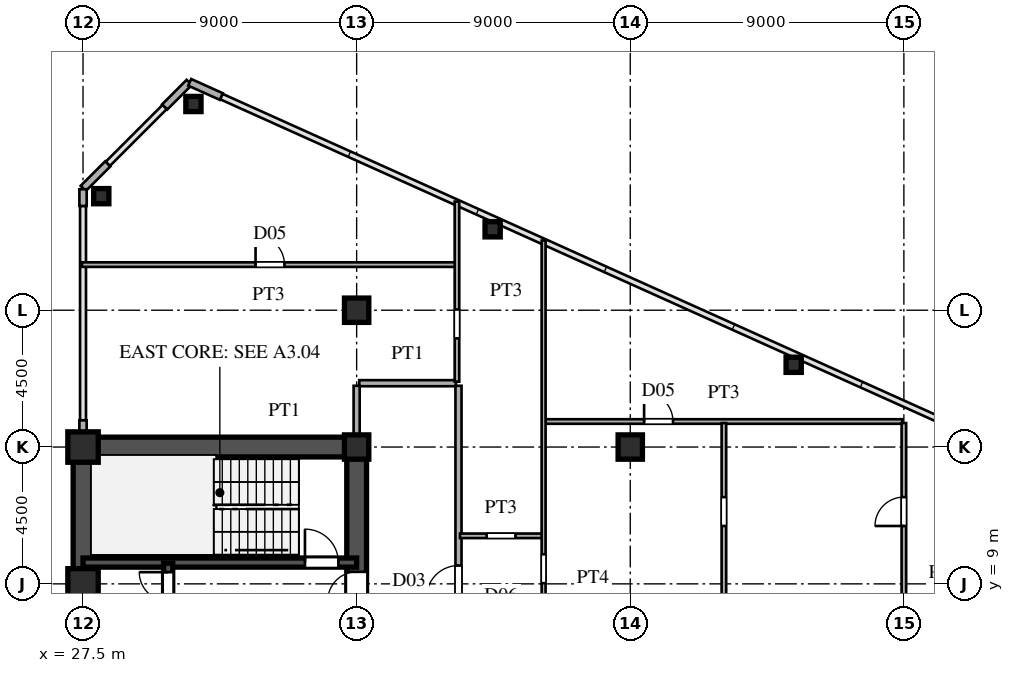
"""IFC4 building model, lengths in metres.
Left out: names, types, materials, properties, quantities, classifications, styles, units other than length and angle.
Written with IfcOpenShell. Run it as: python <this file> out.ifc"""

import sys

from ifc_helpers import new_model, si_unit, direction, frame, frame_2d, origin, origin_2d, place, context, subcontext, project, spatial, rectangle, hollow_rectangle, i_section, extrude, source, transform, mapped, element, fill, save


model = new_model("IFC4")
c1 = context("Model", 3, precision=1e-05, world=origin(), true_north=direction((0.0, 1.0)))
c2 = subcontext(c1, "Body", "Model", "MODEL_VIEW")
j1 = project(units=[si_unit("LENGTHUNIT", "METRE"), si_unit("PLANEANGLEUNIT", "RADIAN")], contexts=[c1])
p1 = place(None, origin())
s1 = spatial("IfcSite", under=j1, at=p1, CompositionType="ELEMENT")
p2 = place(p1, origin())
s2 = spatial("IfcBuilding", under=s1, at=p2, CompositionType="ELEMENT")
p3 = place(p2, frame((0.0, 0.0, 92.4)))
s3 = spatial("IfcBuildingStorey", under=s2, at=p3, CompositionType="ELEMENT", Elevation=92.4)
m1 = source(origin(), c2, "Body", "SweptSolid", [
    extrude(hollow_rectangle(XDim=1.0, YDim=1.0, WallThickness=0.042, at=origin_2d()), origin(), (0.0, 0.0, 1.0), 3.6),
])
for number, where, z_axis, x_axis in (
    (1, (27.5, 9.0, 0.0), (0.0, 0.0, 1.0), (1.0, 0.0, 0.0)),
    (2, (27.5, 13.5, 0.0), (0.0, 0.0, 1.0), (1.0, 0.0, 0.0)),
):
    element("IfcColumn", number, at=place(p3, frame(where, z_axis=z_axis, x_axis=x_axis)), inside=s3, PredefinedType="COLUMN", context=c2, shape_type="MappedRepresentation", body=[
        mapped(m1, transform((0.0, 0.0, 0.0), scale=1.0)),
    ])
m2 = source(origin(), c2, "Body", "SweptSolid", [
    extrude(i_section(OverallWidth=0.8, OverallDepth=0.8, WebThickness=0.032, FlangeThickness=0.05, at=origin_2d()), origin(), (0.0, 0.0, 1.0), 3.6),
])
for number, where, z_axis, x_axis in (
    (3, (36.5, 13.5, 0.0), (0.0, 0.0, 1.0), (1.0, 0.0, 0.0)),
    (4, (36.5, 18.0, 0.0), (0.0, 0.0, 1.0), (1.0, 0.0, 0.0)),
    (5, (45.5, 13.5, 0.0), (0.0, 0.0, 1.0), (1.0, 0.0, 0.0)),
):
    element("IfcColumn", number, at=place(p3, frame(where, z_axis=z_axis, x_axis=x_axis)), inside=s3, PredefinedType="COLUMN", context=c2, shape_type="MappedRepresentation", body=[
        mapped(m2, transform((0.0, 0.0, 0.0), scale=1.0)),
    ])
m3 = source(origin(), c2, "Body", "SweptSolid", [
    extrude(hollow_rectangle(XDim=0.5, YDim=0.5, WallThickness=0.02, at=origin_2d()), origin(), (0.0, 0.0, 1.0), 3.6),
])
for number, where, z_axis, x_axis in (
    (6, (31.131, 24.783, 0.0), (0.0, 0.0, 1.0), (1.0, 0.0, 0.0)),
    (7, (28.1, 21.751, 0.0), (0.0, 0.0, 1.0), (1.0, 0.0, 0.0)),
    (8, (40.973, 20.661, 0.0), (0.0, 0.0, 1.0), (1.0, 0.0, 0.0)),
    (9, (50.875, 16.205, 0.0), (0.0, 0.0, 1.0), (1.0, 0.0, 0.0)),
):
    element("IfcColumn", number, at=place(p3, frame(where, z_axis=z_axis, x_axis=x_axis)), inside=s3, PredefinedType="COLUMN", context=c2, shape_type="MappedRepresentation", body=[
        mapped(m3, transform((0.0, 0.0, 0.0), scale=1.0)),
    ])
p4 = place(p3, frame((32.049, 25.028, 0.0), z_axis=(0.0, 0.0, 1.0), x_axis=(-0.911929519623, 0.410346866979, 0.0)))
e10 = element("IfcWall", 10, at=p4, inside=s3, PredefinedType="SOLIDWALL", context=c2, shape_type="SweptSolid", body=[
    extrude(rectangle(XDim=1.14, YDim=0.24, at=frame_2d((0.57, 0.0))), origin(), (0.0, 0.0, 1.0), 3.38),
])
for number, where, z_axis, x_axis in (
    (11, (30.993, 25.493, 0.0), (0.0, 0.0, 1.0), (-0.707, -0.707, 0.0)),
    (12, (28.313, 22.813, 0.0), (0.0, 0.0, 1.0), (-0.707, -0.707, 0.0)),
):
    element("IfcWall", number, at=place(p3, frame(where, z_axis=z_axis, x_axis=x_axis)), inside=s3, PredefinedType="SOLIDWALL", context=c2, shape_type="SweptSolid", body=[
        extrude(rectangle(XDim=1.14, YDim=0.24, at=frame_2d((0.57, 0.0))), origin(), (0.0, 0.0, 1.0), 3.38),
    ])
p5 = place(p3, frame((27.5, 13.83, 0.0), z_axis=(0.0, 0.0, 1.0), x_axis=(0.0, 1.0, 0.0)))
e13 = element("IfcWall", 13, at=p5, inside=s3, PredefinedType="SOLIDWALL", context=c2, shape_type="SweptSolid", body=[
    extrude(rectangle(XDim=0.55, YDim=0.24, at=frame_2d((0.275, 0.0))), origin(), (0.0, 0.0, 1.0), 2.88),
])
p6 = place(p3, frame((27.5, 21.43, 0.0), z_axis=(0.0, 0.0, 1.0), x_axis=(0.0, 1.0, 0.0)))
e14 = element("IfcWall", 14, at=p6, inside=s3, PredefinedType="SOLIDWALL", context=c2, shape_type="SweptSolid", body=[
    extrude(rectangle(XDim=0.55, YDim=0.24, at=frame_2d((0.275, 0.0))), origin(), (0.0, 0.0, 1.0), 3.38),
])
p7 = place(p3, frame((27.5, 1.3, 0.0), z_axis=(0.0, 0.0, 1.0), x_axis=(0.0, 1.0, 0.0)))
e15 = element("IfcWall", 15, at=p7, inside=s3, PredefinedType="SHEAR", context=c2, shape_type="SweptSolid", body=[
    extrude(rectangle(XDim=12.2, YDim=0.65, at=frame_2d((6.1, 0.0))), origin(), (0.0, 0.0, 1.0), 3.38),
])
p8 = place(p3, frame((27.5, 13.5, 0.0), z_axis=(0.0, 0.0, 1.0), x_axis=(1.0, 0.0, 0.0)))
e16 = element("IfcWall", 16, at=p8, inside=s3, PredefinedType="SHEAR", context=c2, shape_type="SweptSolid", body=[
    extrude(rectangle(XDim=9.0, YDim=0.65, at=frame_2d((4.5, 0.0))), origin(), (0.0, 0.0, 1.0), 3.38),
])
p9 = place(p3, frame((36.5, 8.2, 0.0), z_axis=(0.0, 0.0, 1.0), x_axis=(0.0, 1.0, 0.0)))
e17 = element("IfcWall", 17, at=p9, inside=s3, PredefinedType="SHEAR", context=c2, shape_type="SweptSolid", body=[
    extrude(rectangle(XDim=5.45, YDim=0.65, at=frame_2d((2.725, 0.0))), origin(), (0.0, 0.0, 1.0), 3.38),
])
p10 = place(p9, frame((0.245, 0.0, 0.0)))
e18 = element("IfcOpeningElement", 18, at=p10, cuts=e17, PredefinedType="OPENING", context=c2, shape_type="SweptSolid", body=[
    extrude(rectangle(XDim=0.95, YDim=2.15, at=frame_2d((0.475, 1.075))), frame((0.0, 0.335, 0.0), z_axis=(0.0, -1.0, 0.0), x_axis=(1.0, 0.0, 0.0)), (0.0, 0.0, 1.0), 0.67),
])
p11 = place(p3, frame((27.5, 9.7, 0.0), z_axis=(0.0, 0.0, 1.0), x_axis=(1.0, 0.0, 0.0)))
e19 = element("IfcWall", 19, at=p11, inside=s3, PredefinedType="SHEAR", context=c2, shape_type="SweptSolid", body=[
    extrude(rectangle(XDim=9.0, YDim=0.3, at=frame_2d((4.5, 0.0))), origin(), (0.0, 0.0, 1.0), 3.38),
])
p12 = place(p11, frame((7.3, 0.0, 0.0)))
e20 = element("IfcOpeningElement", 20, at=p12, cuts=e19, PredefinedType="OPENING", context=c2, shape_type="SweptSolid", body=[
    extrude(rectangle(XDim=1.1, YDim=2.2, at=frame_2d((0.55, 1.1))), frame((0.0, 0.16, 0.0), z_axis=(0.0, -1.0, 0.0), x_axis=(1.0, 0.0, 0.0)), (0.0, 0.0, 1.0), 0.32),
])
p13 = place(p3, frame((30.3, 8.15, 0.0), z_axis=(0.0, 0.0, 1.0), x_axis=(0.0, 1.0, 0.0)))
e21 = element("IfcWall", 21, at=p13, inside=s3, PredefinedType="SHEAR", context=c2, shape_type="SweptSolid", body=[
    extrude(rectangle(XDim=1.53, YDim=0.3, at=frame_2d((0.765, 0.0))), origin(), (0.0, 0.0, 1.0), 3.38),
])
p14 = place(p13, frame((0.285, 0.0, 0.0)))
e22 = element("IfcOpeningElement", 22, at=p14, cuts=e21, PredefinedType="OPENING", context=c2, shape_type="SweptSolid", body=[
    extrude(rectangle(XDim=0.95, YDim=2.15, at=frame_2d((0.475, 1.075))), frame((0.0, 0.16, 0.0), z_axis=(0.0, -1.0, 0.0), x_axis=(1.0, 0.0, 0.0)), (0.0, 0.0, 1.0), 0.32),
])
p15 = place(p3, frame((39.9, 10.58, 0.0), z_axis=(0.0, 0.0, 1.0), x_axis=(1.0, 0.0, 0.0)))
e23 = element("IfcWall", 23, at=p15, inside=s3, PredefinedType="PARTITIONING", context=c2, shape_type="SweptSolid", body=[
    extrude(rectangle(XDim=2.7, YDim=0.15, at=frame_2d((1.35, 0.0))), origin(), (0.0, 0.0, 1.0), 3.38),
])
p16 = place(p15, frame((0.875, 0.0, 0.0)))
e24 = element("IfcOpeningElement", 24, at=p16, cuts=e23, PredefinedType="OPENING", context=c2, shape_type="SweptSolid", body=[
    extrude(rectangle(XDim=0.95, YDim=2.15, at=frame_2d((0.475, 1.075))), frame((0.0, 0.085, 0.0), z_axis=(0.0, -1.0, 0.0), x_axis=(1.0, 0.0, 0.0)), (0.0, 0.0, 1.0), 0.17),
])
p17 = place(p3, frame((42.7, 14.34, 0.0), z_axis=(0.0, 0.0, 1.0), x_axis=(1.0, 0.0, 0.0)))
e25 = element("IfcWall", 25, at=p17, inside=s3, PredefinedType="PARTITIONING", context=c2, shape_type="SweptSolid", body=[
    extrude(rectangle(XDim=11.75, YDim=0.15, at=frame_2d((5.875, 0.0))), origin(), (0.0, 0.0, 1.0), 3.38),
])
p18 = place(p17, frame((3.255, 0.0, 0.0)))
e26 = element("IfcOpeningElement", 26, at=p18, cuts=e25, PredefinedType="OPENING", context=c2, shape_type="SweptSolid", body=[
    extrude(rectangle(XDim=0.95, YDim=2.15, at=frame_2d((0.475, 1.075))), frame((0.0, 0.085, 0.0), z_axis=(0.0, -1.0, 0.0), x_axis=(1.0, 0.0, 0.0)), (0.0, 0.0, 1.0), 0.17),
])
p19 = place(p3, frame((36.585, 15.6, 0.0), z_axis=(0.0, 0.0, 1.0), x_axis=(1.0, 0.0, 0.0)))
e27 = element("IfcWall", 27, at=p19, inside=s3, PredefinedType="PARTITIONING", context=c2, shape_type="SweptSolid", body=[
    extrude(rectangle(XDim=3.18, YDim=0.2, at=frame_2d((1.59, 0.0))), origin(), (0.0, 0.0, 1.0), 3.38),
])
p20 = place(p3, frame((27.465, 19.5, 0.0), z_axis=(0.0, 0.0, 1.0), x_axis=(1.0, 0.0, 0.0)))
e28 = element("IfcWall", 28, at=p20, inside=s3, PredefinedType="PARTITIONING", context=c2, shape_type="SweptSolid", body=[
    extrude(rectangle(XDim=12.285, YDim=0.15, at=frame_2d((6.143, 0.0))), origin(), (0.0, 0.0, 1.0), 3.38),
])
p21 = place(p20, frame((5.71, 0.0, 0.0)))
e29 = element("IfcOpeningElement", 29, at=p21, cuts=e28, PredefinedType="OPENING", context=c2, shape_type="SweptSolid", body=[
    extrude(rectangle(XDim=0.95, YDim=2.15, at=frame_2d((0.475, 1.075))), frame((0.0, 0.085, 0.0), z_axis=(0.0, -1.0, 0.0), x_axis=(1.0, 0.0, 0.0)), (0.0, 0.0, 1.0), 0.17),
])
p22 = place(p3, frame((36.5, 13.83, 0.0), z_axis=(0.0, 0.0, 1.0), x_axis=(0.0, 1.0, 0.0)))
e30 = element("IfcWall", 30, at=p22, inside=s3, PredefinedType="PARTITIONING", context=c2, shape_type="SweptSolid", body=[
    extrude(rectangle(XDim=1.685, YDim=0.2, at=frame_2d((0.842, 0.0))), origin(), (0.0, 0.0, 1.0), 2.68),
])
p23 = place(p3, frame((39.8, 15.65, 0.0), z_axis=(0.0, 0.0, 1.0), x_axis=(0.0, 1.0, 0.0)))
e31 = element("IfcWall", 31, at=p23, inside=s3, PredefinedType="PARTITIONING", context=c2, shape_type="SweptSolid", body=[
    extrude(rectangle(XDim=5.925, YDim=0.15, at=frame_2d((2.962, 0.0))), origin(), (0.0, 0.0, 1.0), 3.38),
])
p24 = place(p23, frame((1.425, 0.0, 0.0)))
e32 = element("IfcOpeningElement", 32, at=p24, cuts=e31, PredefinedType="OPENING", context=c2, shape_type="SweptSolid", body=[
    extrude(rectangle(XDim=0.95, YDim=2.15, at=frame_2d((0.475, 1.075))), frame((0.0, 0.085, 0.0), z_axis=(0.0, -1.0, 0.0), x_axis=(1.0, 0.0, 0.0)), (0.0, 0.0, 1.0), 0.17),
])
p25 = place(p3, frame((39.85, -15.515, 0.0), z_axis=(0.0, 0.0, 1.0), x_axis=(0.0, 1.0, 0.0)))
e33 = element("IfcWall", 33, at=p25, inside=s3, PredefinedType="PARTITIONING", context=c2, shape_type="SweptSolid", body=[
    extrude(rectangle(XDim=31.03, YDim=0.2, at=frame_2d((15.515, 0.0))), origin(), (0.0, 0.0, 1.0), 3.38),
])
p26 = place(p25, frame((0.94, 0.0, 0.0)))
e34 = element("IfcOpeningElement", 34, at=p26, cuts=e33, PredefinedType="OPENING", context=c2, shape_type="SweptSolid", body=[
    extrude(rectangle(XDim=1.05, YDim=2.25, at=frame_2d((0.525, 1.125))), frame((0.0, 0.11, 0.0), z_axis=(0.0, -1.0, 0.0), x_axis=(1.0, 0.0, 0.0)), (0.0, 0.0, 1.0), 0.22),
])
p27 = place(p25, frame((9.765, 0.0, 0.0)))
e35 = element("IfcOpeningElement", 35, at=p27, cuts=e33, PredefinedType="OPENING", context=c2, shape_type="SweptSolid", body=[
    extrude(rectangle(XDim=1.05, YDim=2.25, at=frame_2d((0.525, 1.125))), frame((0.0, 0.11, 0.0), z_axis=(0.0, -1.0, 0.0), x_axis=(1.0, 0.0, 0.0)), (0.0, 0.0, 1.0), 0.22),
])
p28 = place(p25, frame((24.067, 0.0, 0.0)))
e36 = element("IfcOpeningElement", 36, at=p28, cuts=e33, PredefinedType="OPENING", context=c2, shape_type="SweptSolid", body=[
    extrude(rectangle(XDim=1.05, YDim=2.25, at=frame_2d((0.525, 1.125))), frame((0.0, 0.11, 0.0), z_axis=(0.0, -1.0, 0.0), x_axis=(1.0, 0.0, 0.0)), (0.0, 0.0, 1.0), 0.22),
])
p29 = place(p3, frame((42.65, -1.948, 0.0), z_axis=(0.0, 0.0, 1.0), x_axis=(0.0, 1.0, 0.0)))
e37 = element("IfcWall", 37, at=p29, inside=s3, PredefinedType="PARTITIONING", context=c2, shape_type="SweptSolid", body=[
    extrude(rectangle(XDim=22.241, YDim=0.13, at=frame_2d((11.121, 0.0))), origin(), (0.0, 0.0, 1.0), 3.38),
])
p30 = place(p29, frame((10.971, 0.0, 0.0)))
e38 = element("IfcOpeningElement", 38, at=p30, cuts=e37, PredefinedType="OPENING", context=c2, shape_type="SweptSolid", body=[
    extrude(rectangle(XDim=0.95, YDim=2.15, at=frame_2d((0.475, 1.075))), frame((0.0, 0.075, 0.0), z_axis=(0.0, -1.0, 0.0), x_axis=(1.0, 0.0, 0.0)), (0.0, 0.0, 1.0), 0.15),
])
p31 = place(p3, frame((48.58, -12.45, 0.0), z_axis=(0.0, 0.0, 1.0), x_axis=(0.0, 1.0, 0.0)))
e39 = element("IfcWall", 39, at=p31, inside=s3, PredefinedType="PARTITIONING", context=c2, shape_type="SweptSolid", body=[
    extrude(rectangle(XDim=26.738, YDim=0.15, at=frame_2d((13.369, 0.0))), origin(), (0.0, 0.0, 1.0), 3.38),
])
p32 = place(p31, frame((6.975, 0.0, 0.0)))
e40 = element("IfcOpeningElement", 40, at=p32, cuts=e39, PredefinedType="OPENING", context=c2, shape_type="SweptSolid", body=[
    extrude(rectangle(XDim=0.95, YDim=2.15, at=frame_2d((0.475, 1.075))), frame((0.0, 0.085, 0.0), z_axis=(0.0, -1.0, 0.0), x_axis=(1.0, 0.0, 0.0)), (0.0, 0.0, 1.0), 0.17),
])
p33 = place(p31, frame((1.975, 0.0, 0.0)))
e41 = element("IfcOpeningElement", 41, at=p33, cuts=e39, PredefinedType="OPENING", context=c2, shape_type="SweptSolid", body=[
    extrude(rectangle(XDim=0.95, YDim=2.15, at=frame_2d((0.475, 1.075))), frame((0.0, 0.085, 0.0), z_axis=(0.0, -1.0, 0.0), x_axis=(1.0, 0.0, 0.0)), (0.0, 0.0, 1.0), 0.17),
])
p34 = place(p31, frame((23.354, 0.0, 0.0)))
e42 = element("IfcOpeningElement", 42, at=p34, cuts=e39, PredefinedType="OPENING", context=c2, shape_type="SweptSolid", body=[
    extrude(rectangle(XDim=0.95, YDim=2.15, at=frame_2d((0.475, 1.075))), frame((0.0, 0.085, 0.0), z_axis=(0.0, -1.0, 0.0), x_axis=(1.0, 0.0, 0.0)), (0.0, 0.0, 1.0), 0.17),
])
p35 = place(p31, frame((17.435, 0.0, 0.0)))
e43 = element("IfcOpeningElement", 43, at=p35, cuts=e39, PredefinedType="OPENING", context=c2, shape_type="SweptSolid", body=[
    extrude(rectangle(XDim=0.95, YDim=2.15, at=frame_2d((0.475, 1.075))), frame((0.0, 0.085, 0.0), z_axis=(0.0, -1.0, 0.0), x_axis=(1.0, 0.0, 0.0)), (0.0, 0.0, 1.0), 0.17),
])
p36 = place(p3, frame((54.5, -12.45, 0.0), z_axis=(0.0, 0.0, 1.0), x_axis=(0.0, 1.0, 0.0)))
e44 = element("IfcWall", 44, at=p36, inside=s3, PredefinedType="PARTITIONING", context=c2, shape_type="SweptSolid", body=[
    extrude(rectangle(XDim=26.738, YDim=0.15, at=frame_2d((13.369, 0.0))), origin(), (0.0, 0.0, 1.0), 2.68),
])
p37 = place(p36, frame((6.458, 0.0, 0.0)))
e45 = element("IfcOpeningElement", 45, at=p37, cuts=e44, PredefinedType="OPENING", context=c2, shape_type="SweptSolid", body=[
    extrude(rectangle(XDim=0.95, YDim=2.15, at=frame_2d((0.475, 1.075))), frame((0.0, 0.085, 0.0), z_axis=(0.0, -1.0, 0.0), x_axis=(1.0, 0.0, 0.0)), (0.0, 0.0, 1.0), 0.17),
])
p38 = place(p36, frame((11.975, 0.0, 0.0)))
e46 = element("IfcOpeningElement", 46, at=p38, cuts=e44, PredefinedType="OPENING", context=c2, shape_type="SweptSolid", body=[
    extrude(rectangle(XDim=0.95, YDim=2.15, at=frame_2d((0.475, 1.075))), frame((0.0, 0.085, 0.0), z_axis=(0.0, -1.0, 0.0), x_axis=(1.0, 0.0, 0.0)), (0.0, 0.0, 1.0), 0.17),
])
p39 = place(p36, frame((23.354, 0.0, 0.0)))
e47 = element("IfcOpeningElement", 47, at=p39, cuts=e44, PredefinedType="OPENING", context=c2, shape_type="SweptSolid", body=[
    extrude(rectangle(XDim=0.95, YDim=2.15, at=frame_2d((0.475, 1.075))), frame((0.0, 0.085, 0.0), z_axis=(0.0, -1.0, 0.0), x_axis=(1.0, 0.0, 0.0)), (0.0, 0.0, 1.0), 0.17),
])
p40 = place(p36, frame((17.435, 0.0, 0.0)))
e48 = element("IfcOpeningElement", 48, at=p40, cuts=e44, PredefinedType="OPENING", context=c2, shape_type="SweptSolid", body=[
    extrude(rectangle(XDim=0.95, YDim=2.15, at=frame_2d((0.475, 1.075))), frame((0.0, 0.085, 0.0), z_axis=(0.0, -1.0, 0.0), x_axis=(1.0, 0.0, 0.0)), (0.0, 0.0, 1.0), 0.17),
])
m4 = source(origin(), c2, "Body", "SweptSolid", [
    extrude(rectangle(XDim=0.95, YDim=2.15, at=frame_2d((0.475, 1.075))), frame((0.0, 0.025, 0.0), z_axis=(0.0, -1.0, 0.0), x_axis=(1.0, 0.0, 0.0)), (0.0, 0.0, 1.0), 0.05),
])
p41 = place(p10, origin())
e49 = element("IfcDoor", 49, at=p41, inside=s3, OperationType="SINGLE_SWING_LEFT", PredefinedType="DOOR", context=c2, shape_type="MappedRepresentation", body=[
    mapped(m4, transform((0.0, 0.0, 0.0), scale=1.0)),
])
fill(e18, e49)
m5 = source(origin(), c2, "Body", "SweptSolid", [
    extrude(rectangle(XDim=1.1, YDim=2.2, at=frame_2d((0.55, 1.1))), frame((0.0, 0.025, 0.0), z_axis=(0.0, -1.0, 0.0), x_axis=(1.0, 0.0, 0.0)), (0.0, 0.0, 1.0), 0.05),
])
p42 = place(p12, origin())
e50 = element("IfcDoor", 50, at=p42, inside=s3, OperationType="SINGLE_SWING_LEFT", PredefinedType="DOOR", context=c2, shape_type="MappedRepresentation", body=[
    mapped(m5, transform((0.0, 0.0, 0.0), scale=1.0)),
])
fill(e20, e50)
p43 = place(p14, origin())
e51 = element("IfcDoor", 51, at=p43, inside=s3, OperationType="SINGLE_SWING_RIGHT", PredefinedType="DOOR", context=c2, shape_type="MappedRepresentation", body=[
    mapped(m4, transform((0.0, 0.0, 0.0), scale=1.0)),
])
fill(e22, e51)
m6 = source(origin(), c2, "Body", "SweptSolid", [
    extrude(rectangle(XDim=0.95, YDim=2.15, at=frame_2d((0.475, 1.075))), frame((0.0, 0.025, 0.0), z_axis=(0.0, -1.0, 0.0), x_axis=(1.0, 0.0, 0.0)), (0.0, 0.0, 1.0), 0.05),
])
p44 = place(p18, origin())
e52 = element("IfcDoor", 52, at=p44, inside=s3, OperationType="SINGLE_SWING_LEFT", PredefinedType="DOOR", context=c2, shape_type="MappedRepresentation", body=[
    mapped(m6, transform((0.0, 0.0, 0.0), scale=1.0)),
])
fill(e26, e52)
p45 = place(p21, origin())
e53 = element("IfcDoor", 53, at=p45, inside=s3, OperationType="SINGLE_SWING_LEFT", PredefinedType="DOOR", context=c2, shape_type="MappedRepresentation", body=[
    mapped(m6, transform((0.0, 0.0, 0.0), scale=1.0)),
])
fill(e29, e53)
m7 = source(origin(), c2, "Body", "SweptSolid", [
    extrude(rectangle(XDim=1.05, YDim=2.25, at=frame_2d((0.525, 1.125))), frame((0.0, 0.025, 0.0), z_axis=(0.0, -1.0, 0.0), x_axis=(1.0, 0.0, 0.0)), (0.0, 0.0, 1.0), 0.05),
])
p46 = place(p28, origin())
e54 = element("IfcDoor", 54, at=p46, inside=s3, OperationType="SINGLE_SWING_LEFT", PredefinedType="DOOR", context=c2, shape_type="MappedRepresentation", body=[
    mapped(m7, transform((0.0, 0.0, 0.0), scale=1.0)),
])
fill(e36, e54)
p47 = place(p39, origin())
e55 = element("IfcDoor", 55, at=p47, inside=s3, OperationType="SINGLE_SWING_LEFT", PredefinedType="DOOR", context=c2, shape_type="MappedRepresentation", body=[
    mapped(m6, transform((0.0, 0.0, 0.0), scale=1.0)),
])
fill(e47, e55)
save(model, sys.argv[1])
